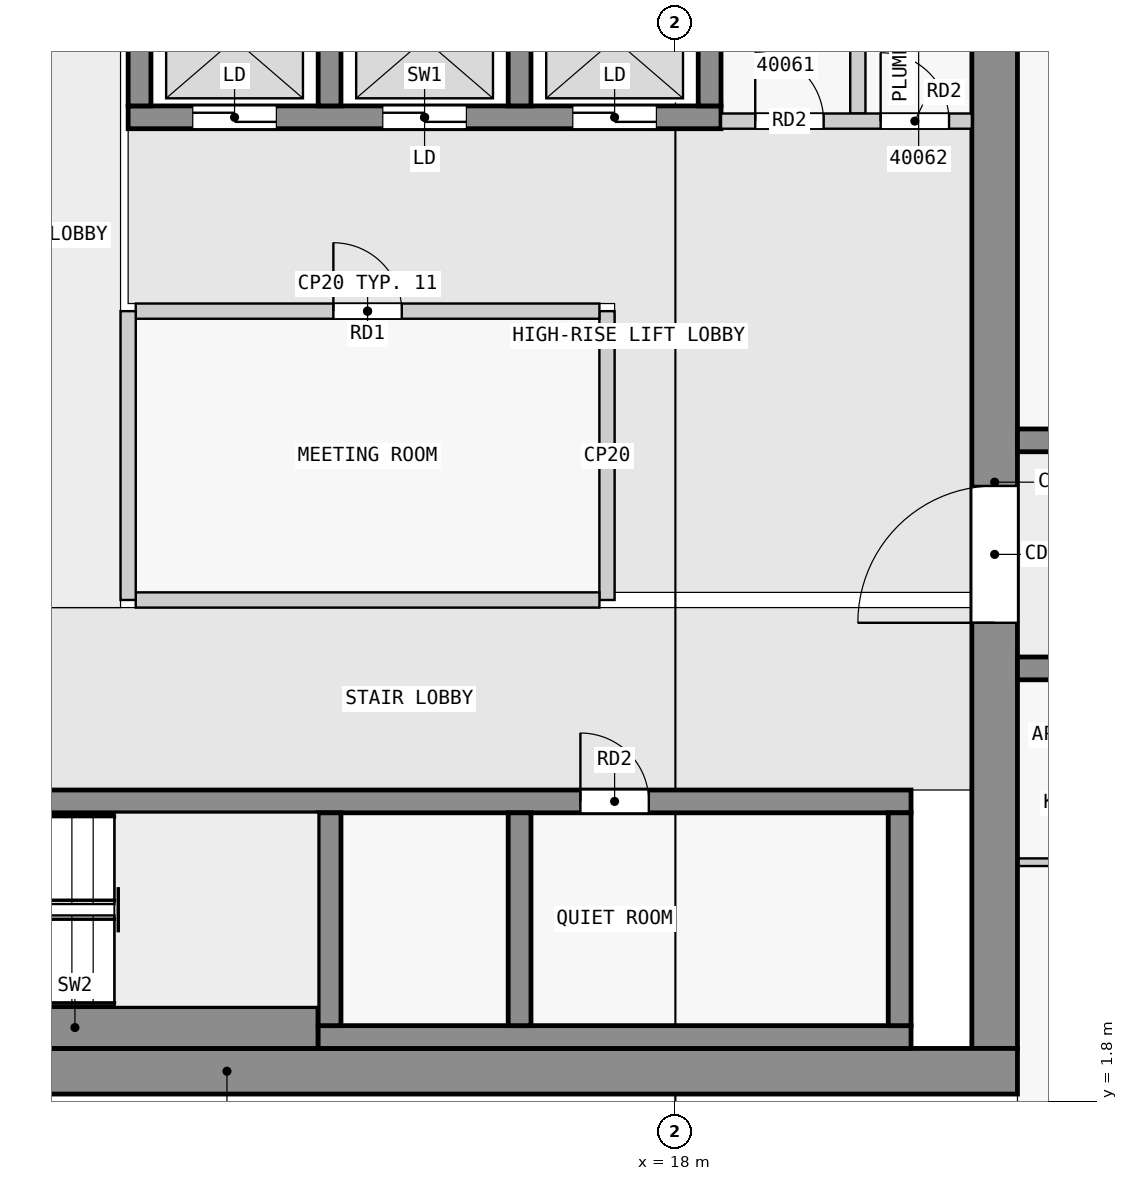
"""IFC4 building model, lengths in metres.
Left out: names, types, materials, properties, quantities, classifications, styles, units other than length and angle.
Written with IfcOpenShell. Run it as: python <this file> out.ifc"""

import sys

from ifc_helpers import new_model, si_unit, direction, frame, frame_2d, origin, place, context, subcontext, project, spatial, rectangle, extrude, element, fill, save


model = new_model("IFC4")
c1 = context("Model", 3, precision=1e-05, world=origin(), true_north=direction((0.0, 1.0)))
c2 = subcontext(c1, "Body", "Model", "MODEL_VIEW")
j1 = project(units=[si_unit("LENGTHUNIT", "METRE"), si_unit("PLANEANGLEUNIT", "RADIAN")], contexts=[c1])
p1 = place(None, origin())
s1 = spatial("IfcSite", under=j1, at=p1, CompositionType="ELEMENT")
p2 = place(p1, origin())
s2 = spatial("IfcBuilding", under=s1, at=p2, CompositionType="ELEMENT")
p3 = place(p2, frame((0.0, 0.0, 156.9)))
s3 = spatial("IfcBuildingStorey", under=s2, at=p3, CompositionType="ELEMENT", Elevation=156.9)
p4 = place(p3, frame((1.7, 2.2, 0.0), z_axis=(0.0, 0.0, 1.0), x_axis=(1.0, 0.0, 0.0)))
e1 = element("IfcWall", 1, at=p4, inside=s3, PredefinedType="SHEAR", context=c2, shape_type="SweptSolid", body=[
    extrude(rectangle(XDim=20.8, YDim=0.6, at=frame_2d((10.4, 0.0))), origin(), (0.0, 0.0, 1.0), 3.25),
])
p5 = place(p3, frame((22.2, 2.5, 0.0), z_axis=(0.0, 0.0, 1.0), x_axis=(0.0, 1.0, 0.0)))
e2 = element("IfcWall", 2, at=p5, inside=s3, PredefinedType="SHEAR", context=c2, shape_type="SweptSolid", body=[
    extrude(rectangle(XDim=14.9, YDim=0.6, at=frame_2d((7.45, 0.0))), origin(), (0.0, 0.0, 1.0), 3.25),
])
p6 = place(p5, frame((5.6, 0.0, 0.0)))
e3 = element("IfcOpeningElement", 3, at=p6, cuts=e2, PredefinedType="OPENING", context=c2, shape_type="SweptSolid", body=[
    extrude(rectangle(XDim=1.8, YDim=2.1, at=frame_2d((0.9, 1.05))), frame((0.0, 0.31, 0.0), z_axis=(0.0, -1.0, 0.0), x_axis=(1.0, 0.0, 0.0)), (0.0, 0.0, 1.0), 0.62),
])
p7 = place(p3, frame((6.9, 2.775, 0.0), z_axis=(0.0, 0.0, 1.0), x_axis=(1.0, 0.0, 0.0)))
e4 = element("IfcWall", 4, at=p7, inside=s3, PredefinedType="SHEAR", context=c2, shape_type="SweptSolid", body=[
    extrude(rectangle(XDim=6.4, YDim=0.55, at=frame_2d((3.2, 0.0))), origin(), (0.0, 0.0, 1.0), 3.25),
])
p8 = place(p3, frame((13.3, 2.65, 0.0), z_axis=(0.0, 0.0, 1.0), x_axis=(1.0, 0.0, 0.0)))
e5 = element("IfcWall", 5, at=p8, inside=s3, PredefinedType="SHEAR", context=c2, shape_type="SweptSolid", body=[
    extrude(rectangle(XDim=7.8, YDim=0.3, at=frame_2d((3.9, 0.0))), origin(), (0.0, 0.0, 1.0), 3.25),
])
for number, where, z_axis, x_axis in (
    (6, (13.45, 2.8, 0.0), (0.0, 0.0, 1.0), (0.0, 1.0, 0.0)),
    (7, (20.95, 2.8, 0.0), (0.0, 0.0, 1.0), (0.0, 1.0, 0.0)),
):
    element("IfcWall", number, at=place(p3, frame(where, z_axis=z_axis, x_axis=x_axis)), inside=s3, PredefinedType="SHEAR", context=c2, shape_type="SweptSolid", body=[
        extrude(rectangle(XDim=2.8, YDim=0.3, at=frame_2d((1.4, 0.0))), origin(), (0.0, 0.0, 1.0), 3.25),
    ])
p9 = place(p3, frame((2.3, 5.75, 0.0), z_axis=(0.0, 0.0, 1.0), x_axis=(1.0, 0.0, 0.0)))
e8 = element("IfcWall", 8, at=p9, inside=s3, PredefinedType="SHEAR", context=c2, shape_type="SweptSolid", body=[
    extrude(rectangle(XDim=18.8, YDim=0.3, at=frame_2d((9.4, 0.0))), origin(), (0.0, 0.0, 1.0), 3.25),
])
p10 = place(p9, frame((4.65, 0.0, 0.0)))
e9 = element("IfcOpeningElement", 9, at=p10, cuts=e8, PredefinedType="OPENING", context=c2, shape_type="SweptSolid", body=[
    extrude(rectangle(XDim=1.1, YDim=2.1, at=frame_2d((0.55, 1.05))), frame((0.0, 0.16, 0.0), z_axis=(0.0, -1.0, 0.0), x_axis=(1.0, 0.0, 0.0)), (0.0, 0.0, 1.0), 0.32),
])
p11 = place(p9, frame((0.45, 0.0, 0.0)))
e10 = element("IfcOpeningElement", 10, at=p11, cuts=e8, PredefinedType="OPENING", context=c2, shape_type="SweptSolid", body=[
    extrude(rectangle(XDim=1.1, YDim=2.1, at=frame_2d((0.55, 1.05))), frame((0.0, 0.16, 0.0), z_axis=(0.0, -1.0, 0.0), x_axis=(1.0, 0.0, 0.0)), (0.0, 0.0, 1.0), 0.32),
])
p12 = place(p9, frame((2.75, 0.0, 0.0)))
e11 = element("IfcOpeningElement", 11, at=p12, cuts=e8, PredefinedType="OPENING", context=c2, shape_type="SweptSolid", body=[
    extrude(rectangle(XDim=1.1, YDim=2.1, at=frame_2d((0.55, 1.05))), frame((0.0, 0.16, 0.0), z_axis=(0.0, -1.0, 0.0), x_axis=(1.0, 0.0, 0.0)), (0.0, 0.0, 1.0), 0.32),
])
p13 = place(p9, frame((14.45, 0.0, 0.0)))
e12 = element("IfcOpeningElement", 12, at=p13, cuts=e8, PredefinedType="OPENING", context=c2, shape_type="SweptSolid", body=[
    extrude(rectangle(XDim=0.9, YDim=2.1, at=frame_2d((0.45, 1.05))), frame((0.0, 0.16, 0.0), z_axis=(0.0, -1.0, 0.0), x_axis=(1.0, 0.0, 0.0)), (0.0, 0.0, 1.0), 0.32),
])
p14 = place(p3, frame((10.8, 14.75, 0.0), z_axis=(0.0, 0.0, 1.0), x_axis=(1.0, 0.0, 0.0)))
e13 = element("IfcWall", 13, at=p14, inside=s3, PredefinedType="SHEAR", context=c2, shape_type="SweptSolid", body=[
    extrude(rectangle(XDim=7.8, YDim=0.3, at=frame_2d((3.9, 0.0))), origin(), (0.0, 0.0, 1.0), 3.25),
])
p15 = place(p14, frame((0.85, 0.0, 0.0)))
e14 = element("IfcOpeningElement", 14, at=p15, cuts=e13, PredefinedType="OPENING", context=c2, shape_type="SweptSolid", body=[
    extrude(rectangle(XDim=1.1, YDim=2.1, at=frame_2d((0.55, 1.05))), frame((0.0, 0.16, 0.0), z_axis=(0.0, -1.0, 0.0), x_axis=(1.0, 0.0, 0.0)), (0.0, 0.0, 1.0), 0.32),
])
p16 = place(p14, frame((3.35, 0.0, 0.0)))
e15 = element("IfcOpeningElement", 15, at=p16, cuts=e13, PredefinedType="OPENING", context=c2, shape_type="SweptSolid", body=[
    extrude(rectangle(XDim=1.1, YDim=2.1, at=frame_2d((0.55, 1.05))), frame((0.0, 0.16, 0.0), z_axis=(0.0, -1.0, 0.0), x_axis=(1.0, 0.0, 0.0)), (0.0, 0.0, 1.0), 0.32),
])
p17 = place(p14, frame((5.85, 0.0, 0.0)))
e16 = element("IfcOpeningElement", 16, at=p17, cuts=e13, PredefinedType="OPENING", context=c2, shape_type="SweptSolid", body=[
    extrude(rectangle(XDim=1.1, YDim=2.1, at=frame_2d((0.55, 1.05))), frame((0.0, 0.16, 0.0), z_axis=(0.0, -1.0, 0.0), x_axis=(1.0, 0.0, 0.0)), (0.0, 0.0, 1.0), 0.32),
])
for number, where, z_axis, x_axis in (
    (17, (10.95, 14.9, 0.0), (0.0, 0.0, 1.0), (0.0, 1.0, 0.0)),
    (18, (13.45, 14.9, 0.0), (0.0, 0.0, 1.0), (0.0, 1.0, 0.0)),
    (19, (15.95, 14.9, 0.0), (0.0, 0.0, 1.0), (0.0, 1.0, 0.0)),
    (20, (18.45, 14.9, 0.0), (0.0, 0.0, 1.0), (0.0, 1.0, 0.0)),
):
    element("IfcWall", number, at=place(p3, frame(where, z_axis=z_axis, x_axis=x_axis)), inside=s3, PredefinedType="SHEAR", context=c2, shape_type="SweptSolid", body=[
        extrude(rectangle(XDim=2.0, YDim=0.3, at=frame_2d((1.0, 0.0))), origin(), (0.0, 0.0, 1.0), 3.25),
    ])
p18 = place(p3, frame((22.5, 7.5, 0.0), z_axis=(0.0, 0.0, 1.0), x_axis=(1.0, 0.0, 0.0)))
e21 = element("IfcWall", 21, at=p18, inside=s3, PredefinedType="SHEAR", context=c2, shape_type="SweptSolid", body=[
    extrude(rectangle(XDim=22.5, YDim=0.3, at=frame_2d((11.25, 0.0))), origin(), (0.0, 0.0, 1.0), 3.25),
])
p19 = place(p18, frame((4.05, 0.0, 0.0)))
e22 = element("IfcOpeningElement", 22, at=p19, cuts=e21, PredefinedType="OPENING", context=c2, shape_type="SweptSolid", body=[
    extrude(rectangle(XDim=1.0, YDim=2.1, at=frame_2d((0.5, 1.05))), frame((0.0, 0.16, 0.0), z_axis=(0.0, -1.0, 0.0), x_axis=(1.0, 0.0, 0.0)), (0.0, 0.0, 1.0), 0.32),
])
p20 = place(p18, frame((10.35, 0.0, 0.0)))
e23 = element("IfcOpeningElement", 23, at=p20, cuts=e21, PredefinedType="OPENING", context=c2, shape_type="SweptSolid", body=[
    extrude(rectangle(XDim=1.8, YDim=2.1, at=frame_2d((0.9, 1.05))), frame((0.0, 0.16, 0.0), z_axis=(0.0, -1.0, 0.0), x_axis=(1.0, 0.0, 0.0)), (0.0, 0.0, 1.0), 0.32),
])
p21 = place(p18, frame((16.85, 0.0, 0.0)))
e24 = element("IfcOpeningElement", 24, at=p21, cuts=e21, PredefinedType="OPENING", context=c2, shape_type="SweptSolid", body=[
    extrude(rectangle(XDim=1.0, YDim=2.1, at=frame_2d((0.5, 1.05))), frame((0.0, 0.16, 0.0), z_axis=(0.0, -1.0, 0.0), x_axis=(1.0, 0.0, 0.0)), (0.0, 0.0, 1.0), 0.32),
])
p22 = place(p3, frame((22.5, 10.5, 0.0), z_axis=(0.0, 0.0, 1.0), x_axis=(1.0, 0.0, 0.0)))
e25 = element("IfcWall", 25, at=p22, inside=s3, PredefinedType="SHEAR", context=c2, shape_type="SweptSolid", body=[
    extrude(rectangle(XDim=22.5, YDim=0.3, at=frame_2d((11.25, 0.0))), origin(), (0.0, 0.0, 1.0), 3.25),
])
p23 = place(p22, frame((4.05, 0.0, 0.0)))
e26 = element("IfcOpeningElement", 26, at=p23, cuts=e25, PredefinedType="OPENING", context=c2, shape_type="SweptSolid", body=[
    extrude(rectangle(XDim=1.0, YDim=2.1, at=frame_2d((0.5, 1.05))), frame((0.0, 0.16, 0.0), z_axis=(0.0, -1.0, 0.0), x_axis=(1.0, 0.0, 0.0)), (0.0, 0.0, 1.0), 0.32),
])
p24 = place(p22, frame((11.65, 0.0, 0.0)))
e27 = element("IfcOpeningElement", 27, at=p24, cuts=e25, PredefinedType="OPENING", context=c2, shape_type="SweptSolid", body=[
    extrude(rectangle(XDim=1.0, YDim=2.1, at=frame_2d((0.5, 1.05))), frame((0.0, 0.16, 0.0), z_axis=(0.0, -1.0, 0.0), x_axis=(1.0, 0.0, 0.0)), (0.0, 0.0, 1.0), 0.32),
])
p25 = place(p22, frame((18.75, 0.0, 0.0)))
e28 = element("IfcOpeningElement", 28, at=p25, cuts=e25, PredefinedType="OPENING", context=c2, shape_type="SweptSolid", body=[
    extrude(rectangle(XDim=0.9, YDim=2.1, at=frame_2d((0.45, 1.05))), frame((0.0, 0.16, 0.0), z_axis=(0.0, -1.0, 0.0), x_axis=(1.0, 0.0, 0.0)), (0.0, 0.0, 1.0), 0.32),
])
p26 = place(p22, frame((20.95, 0.0, 0.0)))
e29 = element("IfcOpeningElement", 29, at=p26, cuts=e25, PredefinedType="OPENING", context=c2, shape_type="SweptSolid", body=[
    extrude(rectangle(XDim=1.0, YDim=2.1, at=frame_2d((0.5, 1.05))), frame((0.0, 0.16, 0.0), z_axis=(0.0, -1.0, 0.0), x_axis=(1.0, 0.0, 0.0)), (0.0, 0.0, 1.0), 0.32),
])
p27 = place(p3, frame((10.8, 8.4, 0.0), z_axis=(0.0, 0.0, 1.0), x_axis=(0.0, 1.0, 0.0)))
e30 = element("IfcWall", 30, at=p27, inside=s3, PredefinedType="PARTITIONING", context=c2, shape_type="SweptSolid", body=[
    extrude(rectangle(XDim=3.8, YDim=0.2, at=frame_2d((1.9, 0.0))), origin(), (0.0, 0.0, 1.0), 3.25),
])
p28 = place(p3, frame((10.9, 8.4, 0.0), z_axis=(0.0, 0.0, 1.0), x_axis=(1.0, 0.0, 0.0)))
e31 = element("IfcWall", 31, at=p28, inside=s3, PredefinedType="PARTITIONING", context=c2, shape_type="SweptSolid", body=[
    extrude(rectangle(XDim=6.1, YDim=0.2, at=frame_2d((3.05, 0.0))), origin(), (0.0, 0.0, 1.0), 3.25),
])
p29 = place(p3, frame((17.1, 8.4, 0.0), z_axis=(0.0, 0.0, 1.0), x_axis=(0.0, 1.0, 0.0)))
e32 = element("IfcWall", 32, at=p29, inside=s3, PredefinedType="PARTITIONING", context=c2, shape_type="SweptSolid", body=[
    extrude(rectangle(XDim=3.8, YDim=0.2, at=frame_2d((1.9, 0.0))), origin(), (0.0, 0.0, 1.0), 3.25),
])
p30 = place(p3, frame((10.9, 12.2, 0.0), z_axis=(0.0, 0.0, 1.0), x_axis=(1.0, 0.0, 0.0)))
e33 = element("IfcWall", 33, at=p30, inside=s3, PredefinedType="PARTITIONING", context=c2, shape_type="SweptSolid", body=[
    extrude(rectangle(XDim=6.1, YDim=0.2, at=frame_2d((3.05, 0.0))), origin(), (0.0, 0.0, 1.0), 3.25),
])
p31 = place(p30, frame((2.6, 0.0, 0.0)))
e34 = element("IfcOpeningElement", 34, at=p31, cuts=e33, PredefinedType="OPENING", context=c2, shape_type="SweptSolid", body=[
    extrude(rectangle(XDim=0.9, YDim=2.1, at=frame_2d((0.45, 1.05))), frame((0.0, 0.11, 0.0), z_axis=(0.0, -1.0, 0.0), x_axis=(1.0, 0.0, 0.0)), (0.0, 0.0, 1.0), 0.22),
])
p32 = place(p3, frame((18.6, 14.7, 0.0), z_axis=(0.0, 0.0, 1.0), x_axis=(1.0, 0.0, 0.0)))
e35 = element("IfcWall", 35, at=p32, inside=s3, PredefinedType="PARTITIONING", context=c2, shape_type="SweptSolid", body=[
    extrude(rectangle(XDim=3.3, YDim=0.2, at=frame_2d((1.65, 0.0))), origin(), (0.0, 0.0, 1.0), 3.25),
])
p33 = place(p32, frame((0.45, 0.0, 0.0)))
e36 = element("IfcOpeningElement", 36, at=p33, cuts=e35, PredefinedType="OPENING", context=c2, shape_type="SweptSolid", body=[
    extrude(rectangle(XDim=0.9, YDim=2.1, at=frame_2d((0.45, 1.05))), frame((0.0, 0.11, 0.0), z_axis=(0.0, -1.0, 0.0), x_axis=(1.0, 0.0, 0.0)), (0.0, 0.0, 1.0), 0.22),
])
p34 = place(p32, frame((2.1, 0.0, 0.0)))
e37 = element("IfcOpeningElement", 37, at=p34, cuts=e35, PredefinedType="OPENING", context=c2, shape_type="SweptSolid", body=[
    extrude(rectangle(XDim=0.9, YDim=2.1, at=frame_2d((0.45, 1.05))), frame((0.0, 0.11, 0.0), z_axis=(0.0, -1.0, 0.0), x_axis=(1.0, 0.0, 0.0)), (0.0, 0.0, 1.0), 0.22),
])
p35 = place(p3, frame((20.4, 14.8, 0.0), z_axis=(0.0, 0.0, 1.0), x_axis=(0.0, 1.0, 0.0)))
e38 = element("IfcWall", 38, at=p35, inside=s3, PredefinedType="PARTITIONING", context=c2, shape_type="SweptSolid", body=[
    extrude(rectangle(XDim=2.6, YDim=0.2, at=frame_2d((1.3, 0.0))), origin(), (0.0, 0.0, 1.0), 3.25),
])
p36 = place(p3, frame((22.5, 4.95, 0.0), z_axis=(0.0, 0.0, 1.0), x_axis=(1.0, 0.0, 0.0)))
e39 = element("IfcWall", 39, at=p36, inside=s3, PredefinedType="PARTITIONING", context=c2, shape_type="SweptSolid", body=[
    extrude(rectangle(XDim=1.75, YDim=0.1, at=frame_2d((0.875, 0.0))), origin(), (0.0, 0.0, 1.0), 3.25),
])
p37 = place(p3, frame((15.95, 2.8, 0.0), z_axis=(0.0, 0.0, 1.0), x_axis=(0.0, 1.0, 0.0)))
e40 = element("IfcWall", 40, at=p37, inside=s3, PredefinedType="SHEAR", context=c2, shape_type="SweptSolid", body=[
    extrude(rectangle(XDim=2.8, YDim=0.3, at=frame_2d((1.4, 0.0))), origin(), (0.0, 0.0, 1.0), 3.25),
])
p38 = place(p31, origin())
e41 = element("IfcDoor", 41, at=p38, inside=s3, OperationType="SINGLE_SWING_LEFT", PredefinedType="DOOR", context=c2, shape_type="SweptSolid", body=[
    extrude(rectangle(XDim=0.9, YDim=2.1, at=frame_2d((0.45, 1.05))), frame((0.0, 0.025, 0.0), z_axis=(0.0, -1.0, 0.0), x_axis=(1.0, 0.0, 0.0)), (0.0, 0.0, 1.0), 0.05),
])
fill(e34, e41)
p39 = place(p15, origin())
e42 = element("IfcDoor", 42, at=p39, inside=s3, OperationType="DOUBLE_DOOR_SLIDING", PredefinedType="DOOR", context=c2, shape_type="SweptSolid", body=[
    extrude(rectangle(XDim=1.1, YDim=2.1, at=frame_2d((0.55, 1.05))), frame((0.0, 0.025, 0.0), z_axis=(0.0, -1.0, 0.0), x_axis=(1.0, 0.0, 0.0)), (0.0, 0.0, 1.0), 0.05),
])
fill(e14, e42)
p40 = place(p16, origin())
e43 = element("IfcDoor", 43, at=p40, inside=s3, OperationType="DOUBLE_DOOR_SLIDING", PredefinedType="DOOR", context=c2, shape_type="SweptSolid", body=[
    extrude(rectangle(XDim=1.1, YDim=2.1, at=frame_2d((0.55, 1.05))), frame((0.0, 0.025, 0.0), z_axis=(0.0, -1.0, 0.0), x_axis=(1.0, 0.0, 0.0)), (0.0, 0.0, 1.0), 0.05),
])
fill(e15, e43)
p41 = place(p17, origin())
e44 = element("IfcDoor", 44, at=p41, inside=s3, OperationType="DOUBLE_DOOR_SLIDING", PredefinedType="DOOR", context=c2, shape_type="SweptSolid", body=[
    extrude(rectangle(XDim=1.1, YDim=2.1, at=frame_2d((0.55, 1.05))), frame((0.0, 0.025, 0.0), z_axis=(0.0, -1.0, 0.0), x_axis=(1.0, 0.0, 0.0)), (0.0, 0.0, 1.0), 0.05),
])
fill(e16, e44)
p42 = place(p6, origin())
e45 = element("IfcDoor", 45, at=p42, inside=s3, OperationType="DOUBLE_DOOR_SINGLE_SWING", PredefinedType="DOOR", context=c2, shape_type="SweptSolid", body=[
    extrude(rectangle(XDim=1.8, YDim=2.1, at=frame_2d((0.9, 1.05))), frame((0.0, 0.025, 0.0), z_axis=(0.0, -1.0, 0.0), x_axis=(1.0, 0.0, 0.0)), (0.0, 0.0, 1.0), 0.05),
])
fill(e3, e45)
p43 = place(p33, origin())
e46 = element("IfcDoor", 46, at=p43, inside=s3, OperationType="SINGLE_SWING_LEFT", PredefinedType="DOOR", context=c2, shape_type="SweptSolid", body=[
    extrude(rectangle(XDim=0.9, YDim=2.1, at=frame_2d((0.45, 1.05))), frame((0.0, 0.025, 0.0), z_axis=(0.0, -1.0, 0.0), x_axis=(1.0, 0.0, 0.0)), (0.0, 0.0, 1.0), 0.05),
])
fill(e36, e46)
p44 = place(p34, origin())
e47 = element("IfcDoor", 47, at=p44, inside=s3, OperationType="SINGLE_SWING_LEFT", PredefinedType="DOOR", context=c2, shape_type="SweptSolid", body=[
    extrude(rectangle(XDim=0.9, YDim=2.1, at=frame_2d((0.45, 1.05))), frame((0.0, 0.025, 0.0), z_axis=(0.0, -1.0, 0.0), x_axis=(1.0, 0.0, 0.0)), (0.0, 0.0, 1.0), 0.05),
])
fill(e37, e47)
p45 = place(p13, origin())
e48 = element("IfcDoor", 48, at=p45, inside=s3, OperationType="SINGLE_SWING_LEFT", PredefinedType="DOOR", context=c2, shape_type="SweptSolid", body=[
    extrude(rectangle(XDim=0.9, YDim=2.1, at=frame_2d((0.45, 1.05))), frame((0.0, 0.025, 0.0), z_axis=(0.0, -1.0, 0.0), x_axis=(1.0, 0.0, 0.0)), (0.0, 0.0, 1.0), 0.05),
])
fill(e12, e48)
save(model, sys.argv[1])
